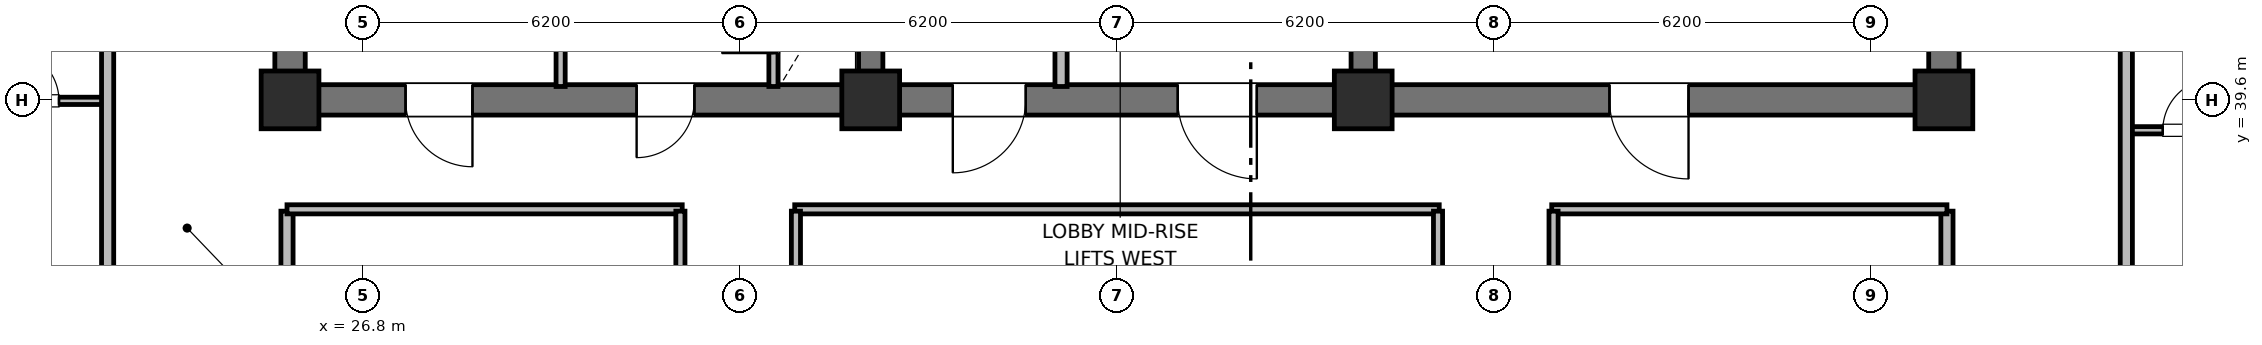
"""IFC4 building model, lengths in metres.
Left out: names, types, materials, properties, quantities, classifications, styles, units other than length and angle.
Written with IfcOpenShell. Run it as: python <this file> out.ifc"""

import sys

from ifc_helpers import new_model, si_unit, direction, frame, frame_2d, origin, origin_2d, place, context, subcontext, project, spatial, rectangle, extrude, element, fill, save


model = new_model("IFC4")
c1 = context("Model", 3, precision=1e-05, world=origin(), true_north=direction((0.0, 1.0)))
c2 = subcontext(c1, "Body", "Model", "MODEL_VIEW")
j1 = project(units=[si_unit("LENGTHUNIT", "METRE"), si_unit("PLANEANGLEUNIT", "RADIAN")], contexts=[c1])
p1 = place(None, origin())
s1 = spatial("IfcSite", under=j1, at=p1, CompositionType="ELEMENT")
p2 = place(p1, origin())
s2 = spatial("IfcBuilding", under=s1, at=p2, CompositionType="ELEMENT")
p3 = place(p2, frame((0.0, 0.0, 143.6)))
s3 = spatial("IfcBuildingStorey", under=s2, at=p3, CompositionType="ELEMENT", Elevation=143.6)
for number, where, z_axis, x_axis in (
    (1, (25.6, 39.85, 0.0), (0.0, 0.0, 1.0), (0.0, 1.0, 0.0)),
    (2, (52.8, 39.85, 0.0), (0.0, 0.0, 1.0), (0.0, 1.0, 0.0)),
):
    element("IfcWall", number, at=place(p3, frame(where, z_axis=z_axis, x_axis=x_axis)), inside=s3, PredefinedType="SHEAR", context=c2, shape_type="SweptSolid", body=[
        extrude(rectangle(XDim=5.7, YDim=0.5, at=frame_2d((2.85, 0.0))), origin(), (0.0, 0.0, 1.0), 4.2),
    ])
p4 = place(p3, frame((52.8, 39.6, 0.0), z_axis=(0.0, 0.0, 1.0), x_axis=(-1.0, 0.0, 0.0)))
e3 = element("IfcWall", 3, at=p4, inside=s3, PredefinedType="SHEAR", context=c2, shape_type="SweptSolid", body=[
    extrude(rectangle(XDim=27.2, YDim=0.5, at=frame_2d((13.6, 0.0))), origin(), (0.0, 0.0, 1.0), 4.2),
])
p5 = place(p4, frame((24.2, 0.0, 0.0)))
e4 = element("IfcOpeningElement", 4, at=p5, cuts=e3, PredefinedType="OPENING", context=c2, shape_type="SweptSolid", body=[
    extrude(rectangle(XDim=1.1, YDim=2.15, at=frame_2d((0.55, 1.075))), frame((0.0, 0.26, 0.0), z_axis=(0.0, -1.0, 0.0), x_axis=(1.0, 0.0, 0.0)), (0.0, 0.0, 1.0), 0.52),
])
p6 = place(p4, frame((20.55, 0.0, 0.0)))
e5 = element("IfcOpeningElement", 5, at=p6, cuts=e3, PredefinedType="OPENING", context=c2, shape_type="SweptSolid", body=[
    extrude(rectangle(XDim=0.95, YDim=2.1, at=frame_2d((0.475, 1.05))), frame((0.0, 0.26, 0.0), z_axis=(0.0, -1.0, 0.0), x_axis=(1.0, 0.0, 0.0)), (0.0, 0.0, 1.0), 0.52),
])
p7 = place(p4, frame((15.1, 0.0, 0.0)))
e6 = element("IfcOpeningElement", 6, at=p7, cuts=e3, PredefinedType="OPENING", context=c2, shape_type="SweptSolid", body=[
    extrude(rectangle(XDim=1.2, YDim=2.15, at=frame_2d((0.6, 1.075))), frame((0.0, 0.26, 0.0), z_axis=(0.0, -1.0, 0.0), x_axis=(1.0, 0.0, 0.0)), (0.0, 0.0, 1.0), 0.52),
])
p8 = place(p4, frame((11.3, 0.0, 0.0)))
e7 = element("IfcOpeningElement", 7, at=p8, cuts=e3, PredefinedType="OPENING", context=c2, shape_type="SweptSolid", body=[
    extrude(rectangle(XDim=1.3, YDim=2.2, at=frame_2d((0.65, 1.1))), frame((0.0, 0.26, 0.0), z_axis=(0.0, -1.0, 0.0), x_axis=(1.0, 0.0, 0.0)), (0.0, 0.0, 1.0), 0.52),
])
p9 = place(p4, frame((4.2, 0.0, 0.0)))
e8 = element("IfcOpeningElement", 8, at=p9, cuts=e3, PredefinedType="OPENING", context=c2, shape_type="SweptSolid", body=[
    extrude(rectangle(XDim=1.3, YDim=2.2, at=frame_2d((0.65, 1.1))), frame((0.0, 0.26, 0.0), z_axis=(0.0, -1.0, 0.0), x_axis=(1.0, 0.0, 0.0)), (0.0, 0.0, 1.0), 0.52),
])
for number, where, z_axis, x_axis in (
    (9, (35.15, 39.85, 0.0), (0.0, 0.0, 1.0), (0.0, 1.0, 0.0)),
    (10, (43.25, 39.85, 0.0), (0.0, 0.0, 1.0), (0.0, 1.0, 0.0)),
):
    element("IfcWall", number, at=place(p3, frame(where, z_axis=z_axis, x_axis=x_axis)), inside=s3, PredefinedType="SHEAR", context=c2, shape_type="SweptSolid", body=[
        extrude(rectangle(XDim=5.7, YDim=0.4, at=frame_2d((2.85, 0.0))), origin(), (0.0, 0.0, 1.0), 4.2),
    ])
for number, where, z_axis, x_axis in (
    (11, (25.6, 39.6, 0.0), (0.0, 0.0, 1.0), (1.0, 0.0, 0.0)),
    (12, (35.15, 39.6, 0.0), (0.0, 0.0, 1.0), (1.0, 0.0, 0.0)),
    (13, (43.25, 39.6, 0.0), (0.0, 0.0, 1.0), (1.0, 0.0, 0.0)),
    (14, (52.8, 39.6, 0.0), (0.0, 0.0, 1.0), (1.0, 0.0, 0.0)),
):
    element("IfcColumn", number, at=place(p3, frame(where, z_axis=z_axis, x_axis=x_axis)), inside=s3, PredefinedType="COLUMN", context=c2, shape_type="SweptSolid", body=[
        extrude(rectangle(XDim=0.95, YDim=0.95, at=origin_2d()), origin(), (0.0, 0.0, 1.0), 4.2),
    ])
p10 = place(p3, frame((33.55, 39.82, 0.0), z_axis=(0.0, 0.0, 1.0), x_axis=(0.0, 1.0, 0.0)))
e15 = element("IfcWall", 15, at=p10, inside=s3, PredefinedType="PARTITIONING", context=c2, shape_type="SweptSolid", body=[
    extrude(rectangle(XDim=2.13, YDim=0.15, at=frame_2d((1.065, 0.0))), origin(), (0.0, 0.0, 1.0), 3.05),
])
p11 = place(p10, frame((0.55, 0.0, 0.0)))
e16 = element("IfcOpeningElement", 16, at=p11, cuts=e15, PredefinedType="OPENING", context=c2, shape_type="SweptSolid", body=[
    extrude(rectangle(XDim=0.85, YDim=2.05, at=frame_2d((0.425, 1.025))), frame((0.0, 0.085, 0.0), z_axis=(0.0, -1.0, 0.0), x_axis=(1.0, 0.0, 0.0)), (0.0, 0.0, 1.0), 0.17),
])
p12 = place(p3, frame((30.05, 39.82, 0.0), z_axis=(0.0, 0.0, 1.0), x_axis=(0.0, 1.0, 0.0)))
e17 = element("IfcWall", 17, at=p12, inside=s3, PredefinedType="PARTITIONING", context=c2, shape_type="SweptSolid", body=[
    extrude(rectangle(XDim=2.13, YDim=0.15, at=frame_2d((1.065, 0.0))), origin(), (0.0, 0.0, 1.0), 3.05),
])
p13 = place(p3, frame((38.28, 39.82, 0.0), z_axis=(0.0, 0.0, 1.0), x_axis=(0.0, 1.0, 0.0)))
e18 = element("IfcWall", 18, at=p13, inside=s3, PredefinedType="PARTITIONING", context=c2, shape_type="SweptSolid", body=[
    extrude(rectangle(XDim=2.73, YDim=0.2, at=frame_2d((1.365, 0.0))), origin(), (0.0, 0.0, 1.0), 3.05),
])
for number, where, z_axis, x_axis in (
    (19, (25.55, 18.63, 0.0), (0.0, 0.0, 1.0), (0.0, 1.0, 0.0)),
    (20, (52.85, 18.63, 0.0), (0.0, 0.0, 1.0), (0.0, 1.0, 0.0)),
):
    element("IfcWall", number, at=place(p3, frame(where, z_axis=z_axis, x_axis=x_axis)), inside=s3, PredefinedType="PARTITIONING", context=c2, shape_type="SweptSolid", body=[
        extrude(rectangle(XDim=19.14, YDim=0.2, at=frame_2d((9.57, 0.0))), origin(), (0.0, 0.0, 1.0), 3.05),
    ])
p14 = place(p3, frame((25.55, 37.8, 0.0), z_axis=(0.0, 0.0, 1.0), x_axis=(1.0, 0.0, 0.0)))
e21 = element("IfcWall", 21, at=p14, inside=s3, PredefinedType="PARTITIONING", context=c2, shape_type="SweptSolid", body=[
    extrude(rectangle(XDim=6.5, YDim=0.15, at=frame_2d((3.25, 0.0))), origin(), (0.0, 0.0, 1.0), 3.05),
])
p15 = place(p3, frame((33.9, 37.8, 0.0), z_axis=(0.0, 0.0, 1.0), x_axis=(1.0, 0.0, 0.0)))
e22 = element("IfcWall", 22, at=p15, inside=s3, PredefinedType="PARTITIONING", context=c2, shape_type="SweptSolid", body=[
    extrude(rectangle(XDim=10.6, YDim=0.15, at=frame_2d((5.3, 0.0))), origin(), (0.0, 0.0, 1.0), 3.05),
])
p16 = place(p3, frame((46.35, 37.8, 0.0), z_axis=(0.0, 0.0, 1.0), x_axis=(1.0, 0.0, 0.0)))
e23 = element("IfcWall", 23, at=p16, inside=s3, PredefinedType="PARTITIONING", context=c2, shape_type="SweptSolid", body=[
    extrude(rectangle(XDim=6.5, YDim=0.15, at=frame_2d((3.25, 0.0))), origin(), (0.0, 0.0, 1.0), 3.05),
])
p17 = place(p3, frame((32.02, 18.63, 0.0), z_axis=(0.0, 0.0, 1.0), x_axis=(0.0, 1.0, 0.0)))
e24 = element("IfcWall", 24, at=p17, inside=s3, PredefinedType="PARTITIONING", context=c2, shape_type="SweptSolid", body=[
    extrude(rectangle(XDim=19.14, YDim=0.15, at=frame_2d((9.57, 0.0))), origin(), (0.0, 0.0, 1.0), 3.05),
])
p18 = place(p17, frame((5.5, 0.0, 0.0)))
e25 = element("IfcOpeningElement", 25, at=p18, cuts=e24, PredefinedType="OPENING", context=c2, shape_type="SweptSolid", body=[
    extrude(rectangle(XDim=1.3, YDim=2.2, at=frame_2d((0.65, 1.1))), frame((0.0, 0.085, 0.0), z_axis=(0.0, -1.0, 0.0), x_axis=(1.0, 0.0, 0.0)), (0.0, 0.0, 1.0), 0.17),
])
p19 = place(p3, frame((33.92, 18.63, 0.0), z_axis=(0.0, 0.0, 1.0), x_axis=(0.0, 1.0, 0.0)))
e26 = element("IfcWall", 26, at=p19, inside=s3, PredefinedType="PARTITIONING", context=c2, shape_type="SweptSolid", body=[
    extrude(rectangle(XDim=19.14, YDim=0.15, at=frame_2d((9.57, 0.0))), origin(), (0.0, 0.0, 1.0), 3.05),
])
p20 = place(p19, frame((4.5, 0.0, 0.0)))
e27 = element("IfcOpeningElement", 27, at=p20, cuts=e26, PredefinedType="OPENING", context=c2, shape_type="SweptSolid", body=[
    extrude(rectangle(XDim=1.3, YDim=2.2, at=frame_2d((0.65, 1.1))), frame((0.0, 0.085, 0.0), z_axis=(0.0, -1.0, 0.0), x_axis=(1.0, 0.0, 0.0)), (0.0, 0.0, 1.0), 0.17),
])
p21 = place(p3, frame((44.48, 18.63, 0.0), z_axis=(0.0, 0.0, 1.0), x_axis=(0.0, 1.0, 0.0)))
e28 = element("IfcWall", 28, at=p21, inside=s3, PredefinedType="PARTITIONING", context=c2, shape_type="SweptSolid", body=[
    extrude(rectangle(XDim=19.14, YDim=0.15, at=frame_2d((9.57, 0.0))), origin(), (0.0, 0.0, 1.0), 3.05),
])
p22 = place(p3, frame((46.38, 18.63, 0.0), z_axis=(0.0, 0.0, 1.0), x_axis=(0.0, 1.0, 0.0)))
e29 = element("IfcWall", 29, at=p22, inside=s3, PredefinedType="PARTITIONING", context=c2, shape_type="SweptSolid", body=[
    extrude(rectangle(XDim=19.14, YDim=0.15, at=frame_2d((9.57, 0.0))), origin(), (0.0, 0.0, 1.0), 3.05),
])
p23 = place(p22, frame((6.5, 0.0, 0.0)))
e30 = element("IfcOpeningElement", 30, at=p23, cuts=e29, PredefinedType="OPENING", context=c2, shape_type="SweptSolid", body=[
    extrude(rectangle(XDim=1.0, YDim=2.15, at=frame_2d((0.5, 1.075))), frame((0.0, 0.085, 0.0), z_axis=(0.0, -1.0, 0.0), x_axis=(1.0, 0.0, 0.0)), (0.0, 0.0, 1.0), 0.17),
])
p24 = place(p3, frame((20.35, 39.584, 0.0), z_axis=(0.0, 0.0, 1.0), x_axis=(1.0, 0.0, 0.0)))
e31 = element("IfcWall", 31, at=p24, inside=s3, PredefinedType="PARTITIONING", context=c2, shape_type="SweptSolid", body=[
    extrude(rectangle(XDim=2.25, YDim=0.12, at=frame_2d((1.125, 0.0))), origin(), (0.0, 0.0, 1.0), 3.05),
])
p25 = place(p24, frame((0.6, 0.0, 0.0)))
e32 = element("IfcOpeningElement", 32, at=p25, cuts=e31, PredefinedType="OPENING", context=c2, shape_type="SweptSolid", body=[
    extrude(rectangle(XDim=0.85, YDim=2.1, at=frame_2d((0.425, 1.05))), frame((0.0, 0.07, 0.0), z_axis=(0.0, -1.0, 0.0), x_axis=(1.0, 0.0, 0.0)), (0.0, 0.0, 1.0), 0.14),
])
p26 = place(p3, frame((22.6, 10.6, 0.0), z_axis=(0.0, 0.0, 1.0), x_axis=(0.0, 1.0, 0.0)))
e33 = element("IfcWall", 33, at=p26, inside=s3, PredefinedType="PARTITIONING", context=c2, shape_type="SweptSolid", body=[
    extrude(rectangle(XDim=35.2, YDim=0.2, at=frame_2d((17.6, 0.0))), origin(), (0.0, 0.0, 1.0), 3.05),
])
p27 = place(p26, frame((2.65, 0.0, 0.0)))
e34 = element("IfcOpeningElement", 34, at=p27, cuts=e33, PredefinedType="OPENING", context=c2, shape_type="SweptSolid", body=[
    extrude(rectangle(XDim=1.0, YDim=2.15, at=frame_2d((0.5, 1.075))), frame((0.0, 0.11, 0.0), z_axis=(0.0, -1.0, 0.0), x_axis=(1.0, 0.0, 0.0)), (0.0, 0.0, 1.0), 0.22),
])
p28 = place(p26, frame((12.65, 0.0, 0.0)))
e35 = element("IfcOpeningElement", 35, at=p28, cuts=e33, PredefinedType="OPENING", context=c2, shape_type="SweptSolid", body=[
    extrude(rectangle(XDim=1.0, YDim=2.15, at=frame_2d((0.5, 1.075))), frame((0.0, 0.11, 0.0), z_axis=(0.0, -1.0, 0.0), x_axis=(1.0, 0.0, 0.0)), (0.0, 0.0, 1.0), 0.22),
])
p29 = place(p26, frame((24.134, 0.0, 0.0)))
e36 = element("IfcOpeningElement", 36, at=p29, cuts=e33, PredefinedType="OPENING", context=c2, shape_type="SweptSolid", body=[
    extrude(rectangle(XDim=1.0, YDim=2.15, at=frame_2d((0.5, 1.075))), frame((0.0, 0.11, 0.0), z_axis=(0.0, -1.0, 0.0), x_axis=(1.0, 0.0, 0.0)), (0.0, 0.0, 1.0), 0.22),
])
p30 = place(p3, frame((55.8, 39.1, 0.0), z_axis=(0.0, 0.0, 1.0), x_axis=(1.0, 0.0, 0.0)))
e37 = element("IfcWall", 37, at=p30, inside=s3, PredefinedType="PARTITIONING", context=c2, shape_type="SweptSolid", body=[
    extrude(rectangle(XDim=2.25, YDim=0.12, at=frame_2d((1.125, 0.0))), origin(), (0.0, 0.0, 1.0), 3.05),
])
p31 = place(p30, frame((0.6, 0.0, 0.0)))
e38 = element("IfcOpeningElement", 38, at=p31, cuts=e37, PredefinedType="OPENING", context=c2, shape_type="SweptSolid", body=[
    extrude(rectangle(XDim=0.85, YDim=2.1, at=frame_2d((0.425, 1.05))), frame((0.0, 0.07, 0.0), z_axis=(0.0, -1.0, 0.0), x_axis=(1.0, 0.0, 0.0)), (0.0, 0.0, 1.0), 0.14),
])
p32 = place(p3, frame((55.8, 10.6, 0.0), z_axis=(0.0, 0.0, 1.0), x_axis=(0.0, 1.0, 0.0)))
e39 = element("IfcWall", 39, at=p32, inside=s3, PredefinedType="PARTITIONING", context=c2, shape_type="SweptSolid", body=[
    extrude(rectangle(XDim=35.2, YDim=0.2, at=frame_2d((17.6, 0.0))), origin(), (0.0, 0.0, 1.0), 3.05),
])
p33 = place(p32, frame((2.65, 0.0, 0.0)))
e40 = element("IfcOpeningElement", 40, at=p33, cuts=e39, PredefinedType="OPENING", context=c2, shape_type="SweptSolid", body=[
    extrude(rectangle(XDim=1.0, YDim=2.15, at=frame_2d((0.5, 1.075))), frame((0.0, 0.11, 0.0), z_axis=(0.0, -1.0, 0.0), x_axis=(1.0, 0.0, 0.0)), (0.0, 0.0, 1.0), 0.22),
])
p34 = place(p32, frame((12.518, 0.0, 0.0)))
e41 = element("IfcOpeningElement", 41, at=p34, cuts=e39, PredefinedType="OPENING", context=c2, shape_type="SweptSolid", body=[
    extrude(rectangle(XDim=1.0, YDim=2.15, at=frame_2d((0.5, 1.075))), frame((0.0, 0.11, 0.0), z_axis=(0.0, -1.0, 0.0), x_axis=(1.0, 0.0, 0.0)), (0.0, 0.0, 1.0), 0.22),
])
p35 = place(p32, frame((23.65, 0.0, 0.0)))
e42 = element("IfcOpeningElement", 42, at=p35, cuts=e39, PredefinedType="OPENING", context=c2, shape_type="SweptSolid", body=[
    extrude(rectangle(XDim=1.0, YDim=2.15, at=frame_2d((0.5, 1.075))), frame((0.0, 0.11, 0.0), z_axis=(0.0, -1.0, 0.0), x_axis=(1.0, 0.0, 0.0)), (0.0, 0.0, 1.0), 0.22),
])
p36 = place(p11, origin())
e43 = element("IfcDoor", 43, at=p36, inside=s3, OperationType="SINGLE_SWING_LEFT", PredefinedType="TRAPDOOR", context=c2, shape_type="SweptSolid", body=[
    extrude(rectangle(XDim=0.85, YDim=2.05, at=frame_2d((0.425, 1.025))), frame((0.0, 0.025, 0.0), z_axis=(0.0, -1.0, 0.0), x_axis=(1.0, 0.0, 0.0)), (0.0, 0.0, 1.0), 0.05),
])
fill(e16, e43)
p37 = place(p25, origin())
e44 = element("IfcDoor", 44, at=p37, inside=s3, OperationType="SINGLE_SWING_LEFT", PredefinedType="DOOR", context=c2, shape_type="SweptSolid", body=[
    extrude(rectangle(XDim=0.85, YDim=2.1, at=frame_2d((0.425, 1.05))), frame((0.0, 0.025, 0.0), z_axis=(0.0, -1.0, 0.0), x_axis=(1.0, 0.0, 0.0)), (0.0, 0.0, 1.0), 0.05),
])
fill(e32, e44)
p38 = place(p31, origin())
e45 = element("IfcDoor", 45, at=p38, inside=s3, OperationType="SINGLE_SWING_RIGHT", PredefinedType="DOOR", context=c2, shape_type="SweptSolid", body=[
    extrude(rectangle(XDim=0.85, YDim=2.1, at=frame_2d((0.425, 1.05))), frame((0.0, 0.025, 0.0), z_axis=(0.0, -1.0, 0.0), x_axis=(1.0, 0.0, 0.0)), (0.0, 0.0, 1.0), 0.05),
])
fill(e38, e45)
p39 = place(p5, origin())
e46 = element("IfcDoor", 46, at=p39, inside=s3, OperationType="SINGLE_SWING_LEFT", PredefinedType="DOOR", context=c2, shape_type="SweptSolid", body=[
    extrude(rectangle(XDim=1.1, YDim=2.15, at=frame_2d((0.55, 1.075))), frame((0.0, 0.025, 0.0), z_axis=(0.0, -1.0, 0.0), x_axis=(1.0, 0.0, 0.0)), (0.0, 0.0, 1.0), 0.05),
])
fill(e4, e46)
p40 = place(p6, origin())
e47 = element("IfcDoor", 47, at=p40, inside=s3, OperationType="SINGLE_SWING_RIGHT", PredefinedType="DOOR", context=c2, shape_type="SweptSolid", body=[
    extrude(rectangle(XDim=0.95, YDim=2.1, at=frame_2d((0.475, 1.05))), frame((0.0, 0.025, 0.0), z_axis=(0.0, -1.0, 0.0), x_axis=(1.0, 0.0, 0.0)), (0.0, 0.0, 1.0), 0.05),
])
fill(e5, e47)
p41 = place(p7, origin())
e48 = element("IfcDoor", 48, at=p41, inside=s3, OperationType="SINGLE_SWING_RIGHT", PredefinedType="DOOR", context=c2, shape_type="SweptSolid", body=[
    extrude(rectangle(XDim=1.2, YDim=2.15, at=frame_2d((0.6, 1.075))), frame((0.0, 0.025, 0.0), z_axis=(0.0, -1.0, 0.0), x_axis=(1.0, 0.0, 0.0)), (0.0, 0.0, 1.0), 0.05),
])
fill(e6, e48)
p42 = place(p8, origin())
e49 = element("IfcDoor", 49, at=p42, inside=s3, OperationType="SINGLE_SWING_LEFT", PredefinedType="DOOR", context=c2, shape_type="SweptSolid", body=[
    extrude(rectangle(XDim=1.3, YDim=2.2, at=frame_2d((0.65, 1.1))), frame((0.0, 0.025, 0.0), z_axis=(0.0, -1.0, 0.0), x_axis=(1.0, 0.0, 0.0)), (0.0, 0.0, 1.0), 0.05),
])
fill(e7, e49)
p43 = place(p9, origin())
e50 = element("IfcDoor", 50, at=p43, inside=s3, OperationType="SINGLE_SWING_LEFT", PredefinedType="DOOR", context=c2, shape_type="SweptSolid", body=[
    extrude(rectangle(XDim=1.3, YDim=2.2, at=frame_2d((0.65, 1.1))), frame((0.0, 0.025, 0.0), z_axis=(0.0, -1.0, 0.0), x_axis=(1.0, 0.0, 0.0)), (0.0, 0.0, 1.0), 0.05),
])
fill(e8, e50)
save(model, sys.argv[1])
